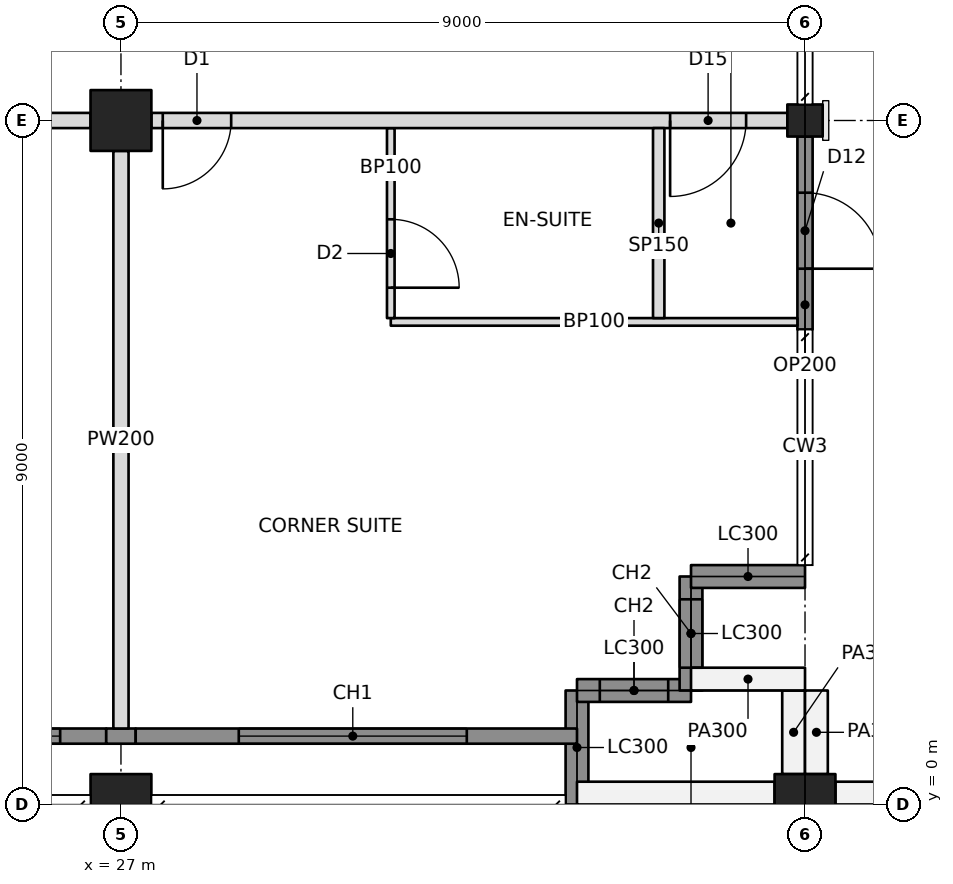
"""IFC4 building model, lengths in metres.
Left out: names, types, materials, properties, quantities, classifications, styles, units other than length and angle.
Written with IfcOpenShell. Run it as: python <this file> out.ifc"""

import sys

from ifc_helpers import new_model, si_unit, direction, frame, frame_2d, origin, origin_2d, place, context, subcontext, project, spatial, rectangle, hollow_rectangle, i_section, extrude, element, fill, save


model = new_model("IFC4")
c1 = context("Model", 3, precision=1e-05, world=origin(), true_north=direction((0.0, 1.0)))
c2 = subcontext(c1, "Body", "Model", "MODEL_VIEW")
j1 = project(units=[si_unit("LENGTHUNIT", "METRE"), si_unit("PLANEANGLEUNIT", "RADIAN")], contexts=[c1])
p1 = place(None, origin())
s1 = spatial("IfcSite", under=j1, at=p1, CompositionType="ELEMENT")
p2 = place(p1, origin())
s2 = spatial("IfcBuilding", under=s1, at=p2, CompositionType="ELEMENT")
p3 = place(p2, frame((0.0, 0.0, 226.6)))
s3 = spatial("IfcBuildingStorey", under=s2, at=p3, CompositionType="ELEMENT", Elevation=226.6)
p4 = place(p3, frame((27.0, 0.0, 0.0), z_axis=(0.0, 0.0, 1.0), x_axis=(1.0, 0.0, 0.0)))
e1 = element("IfcColumn", 1, at=p4, inside=s3, PredefinedType="COLUMN", context=c2, shape_type="SweptSolid", body=[
    extrude(hollow_rectangle(XDim=0.8, YDim=0.8, WallThickness=0.05, at=origin_2d()), origin(), (0.0, 0.0, 1.0), 3.6),
])
p5 = place(p3, frame((27.0, 9.0, 0.0), z_axis=(0.0, 0.0, 1.0), x_axis=(1.0, 0.0, 0.0)))
e2 = element("IfcColumn", 2, at=p5, inside=s3, PredefinedType="COLUMN", context=c2, shape_type="SweptSolid", body=[
    extrude(hollow_rectangle(XDim=0.8, YDim=0.8, WallThickness=0.1, at=origin_2d()), origin(), (0.0, 0.0, 1.0), 3.6),
])
p6 = place(p3, frame((36.0, 0.0, 0.0), z_axis=(0.0, 0.0, 1.0), x_axis=(1.0, 0.0, 0.0)))
e3 = element("IfcColumn", 3, at=p6, inside=s3, PredefinedType="COLUMN", context=c2, shape_type="SweptSolid", body=[
    extrude(hollow_rectangle(XDim=0.8, YDim=0.8, WallThickness=0.05, at=origin_2d()), origin(), (0.0, 0.0, 1.0), 3.6),
])
p7 = place(p3, frame((36.0, 9.0, 0.0), z_axis=(0.0, 0.0, 1.0), x_axis=(0.0, 1.0, 0.0)))
e4 = element("IfcColumn", 4, at=p7, inside=s3, PredefinedType="COLUMN", context=c2, shape_type="SweptSolid", body=[
    extrude(i_section(OverallWidth=0.422, OverallDepth=0.465, WebThickness=0.045, FlangeThickness=0.073, at=origin_2d()), origin(), (0.0, 0.0, 1.0), 3.6),
])
p8 = place(p3, frame((33.0, 0.0, 0.0), z_axis=(0.0, 0.0, 1.0), x_axis=(0.0, 1.0, 0.0)))
e5 = element("IfcWall", 5, at=p8, inside=s3, PredefinedType="SOLIDWALL", context=c2, shape_type="SweptSolid", body=[
    extrude(rectangle(XDim=1.5, YDim=0.3, at=frame_2d((0.75, 0.0))), origin(), (0.0, 0.0, 1.0), 2.62),
])
p9 = place(p3, frame((33.0, 1.5, 0.0), z_axis=(0.0, 0.0, 1.0), x_axis=(1.0, 0.0, 0.0)))
e6 = element("IfcWall", 6, at=p9, inside=s3, PredefinedType="SOLIDWALL", context=c2, shape_type="SweptSolid", body=[
    extrude(rectangle(XDim=1.5, YDim=0.3, at=frame_2d((0.75, 0.0))), origin(), (0.0, 0.0, 1.0), 3.4),
])
p10 = place(p9, frame((0.3, 0.0, 0.6)))
e7 = element("IfcOpeningElement", 7, at=p10, cuts=e6, PredefinedType="OPENING", context=c2, shape_type="SweptSolid", body=[
    extrude(rectangle(XDim=0.9, YDim=2.2, at=frame_2d((0.45, 1.1))), frame((0.0, 0.16, 0.0), z_axis=(0.0, -1.0, 0.0), x_axis=(1.0, 0.0, 0.0)), (0.0, 0.0, 1.0), 0.32),
])
p11 = place(p3, frame((34.5, 1.5, 0.0), z_axis=(0.0, 0.0, 1.0), x_axis=(0.0, 1.0, 0.0)))
e8 = element("IfcWall", 8, at=p11, inside=s3, PredefinedType="SOLIDWALL", context=c2, shape_type="SweptSolid", body=[
    extrude(rectangle(XDim=1.5, YDim=0.3, at=frame_2d((0.75, 0.0))), origin(), (0.0, 0.0, 1.0), 3.4),
])
p12 = place(p11, frame((0.3, 0.0, 0.6)))
e9 = element("IfcOpeningElement", 9, at=p12, cuts=e8, PredefinedType="OPENING", context=c2, shape_type="SweptSolid", body=[
    extrude(rectangle(XDim=0.9, YDim=2.2, at=frame_2d((0.45, 1.1))), frame((0.0, 0.16, 0.0), z_axis=(0.0, -1.0, 0.0), x_axis=(1.0, 0.0, 0.0)), (0.0, 0.0, 1.0), 0.32),
])
p13 = place(p3, frame((34.5, 3.0, 0.0), z_axis=(0.0, 0.0, 1.0), x_axis=(1.0, 0.0, 0.0)))
e10 = element("IfcWall", 10, at=p13, inside=s3, PredefinedType="SOLIDWALL", context=c2, shape_type="SweptSolid", body=[
    extrude(rectangle(XDim=1.5, YDim=0.3, at=frame_2d((0.75, 0.0))), origin(), (0.0, 0.0, 1.0), 2.62),
])
p14 = place(p3, frame((36.0, 8.789, 0.0), z_axis=(0.0, 0.0, 1.0), x_axis=(0.0, -1.0, 0.0)))
e11 = element("IfcWall", 11, at=p14, inside=s3, PredefinedType="SOLIDWALL", context=c2, shape_type="SweptSolid", body=[
    extrude(rectangle(XDim=2.539, YDim=0.2, at=frame_2d((1.27, 0.0))), origin(), (0.0, 0.0, 1.0), 2.62),
])
p15 = place(p14, frame((0.739, 0.0, 0.0)))
e12 = element("IfcOpeningElement", 12, at=p15, cuts=e11, PredefinedType="OPENING", context=c2, shape_type="SweptSolid", body=[
    extrude(rectangle(XDim=1.0, YDim=2.1, at=frame_2d((0.5, 1.05))), frame((0.0, 0.11, 0.0), z_axis=(0.0, -1.0, 0.0), x_axis=(1.0, 0.0, 0.0)), (0.0, 0.0, 1.0), 0.22),
])
p16 = place(p3, frame((35.6, 0.15, 0.0), z_axis=(0.0, 0.0, 1.0), x_axis=(-1.0, 0.0, 0.0)))
e13 = element("IfcWall", 13, at=p16, inside=s3, PredefinedType="PARAPET", context=c2, shape_type="SweptSolid", body=[
    extrude(rectangle(XDim=2.6, YDim=0.3, at=frame_2d((1.3, 0.0))), origin(), (0.0, 0.0, 1.0), 1.1),
])
p17 = place(p3, frame((35.85, 1.5, 0.0), z_axis=(0.0, 0.0, 1.0), x_axis=(0.0, -1.0, 0.0)))
e14 = element("IfcWall", 14, at=p17, inside=s3, PredefinedType="PARAPET", context=c2, shape_type="SweptSolid", body=[
    extrude(rectangle(XDim=1.1, YDim=0.3, at=frame_2d((0.55, 0.0))), origin(), (0.0, 0.0, 1.0), 1.1),
])
p18 = place(p3, frame((42.0, 0.15, 0.0), z_axis=(0.0, 0.0, 1.0), x_axis=(-1.0, 0.0, 0.0)))
e15 = element("IfcWall", 15, at=p18, inside=s3, PredefinedType="PARAPET", context=c2, shape_type="SweptSolid", body=[
    extrude(rectangle(XDim=5.6, YDim=0.3, at=frame_2d((2.8, 0.0))), origin(), (0.0, 0.0, 1.0), 1.1),
])
p19 = place(p3, frame((36.15, 0.4, 0.0), z_axis=(0.0, 0.0, 1.0), x_axis=(0.0, 1.0, 0.0)))
e16 = element("IfcWall", 16, at=p19, inside=s3, PredefinedType="PARAPET", context=c2, shape_type="SweptSolid", body=[
    extrude(rectangle(XDim=1.1, YDim=0.3, at=frame_2d((0.55, 0.0))), origin(), (0.0, 0.0, 1.0), 1.1),
])
p20 = place(p3, frame((36.0, 1.65, 0.0), z_axis=(0.0, 0.0, 1.0), x_axis=(-1.0, 0.0, 0.0)))
e17 = element("IfcWall", 17, at=p20, inside=s3, PredefinedType="PARAPET", context=c2, shape_type="SweptSolid", body=[
    extrude(rectangle(XDim=1.5, YDim=0.3, at=frame_2d((0.75, 0.0))), origin(), (0.0, 0.0, 1.0), 1.1),
])
p21 = place(p3, frame((18.4, 9.0, 0.0), z_axis=(0.0, 0.0, 1.0), x_axis=(1.0, 0.0, 0.0)))
e18 = element("IfcWall", 18, at=p21, inside=s3, PredefinedType="PARTITIONING", context=c2, shape_type="SweptSolid", body=[
    extrude(rectangle(XDim=8.2, YDim=0.2, at=frame_2d((4.1, 0.0))), origin(), (0.0, 0.0, 1.0), 2.605),
])
p22 = place(p3, frame((27.4, 9.0, 0.0), z_axis=(0.0, 0.0, 1.0), x_axis=(1.0, 0.0, 0.0)))
e19 = element("IfcWall", 19, at=p22, inside=s3, PredefinedType="PARTITIONING", context=c2, shape_type="SweptSolid", body=[
    extrude(rectangle(XDim=8.368, YDim=0.2, at=frame_2d((4.184, 0.0))), origin(), (0.0, 0.0, 1.0), 2.605),
])
p23 = place(p22, frame((6.825, 0.0, 0.0)))
e20 = element("IfcOpeningElement", 20, at=p23, cuts=e19, PredefinedType="OPENING", context=c2, shape_type="SweptSolid", body=[
    extrude(rectangle(XDim=1.0, YDim=2.1, at=frame_2d((0.5, 1.05))), frame((0.0, 0.11, 0.0), z_axis=(0.0, -1.0, 0.0), x_axis=(1.0, 0.0, 0.0)), (0.0, 0.0, 1.0), 0.22),
])
p24 = place(p22, frame((0.15, 0.0, 0.0)))
e21 = element("IfcOpeningElement", 21, at=p24, cuts=e19, PredefinedType="OPENING", context=c2, shape_type="SweptSolid", body=[
    extrude(rectangle(XDim=0.9, YDim=2.1, at=frame_2d((0.45, 1.05))), frame((0.0, 0.11, 0.0), z_axis=(0.0, -1.0, 0.0), x_axis=(1.0, 0.0, 0.0)), (0.0, 0.0, 1.0), 0.22),
])
p25 = place(p3, frame((27.0, 8.6, 0.0), z_axis=(0.0, 0.0, 1.0), x_axis=(0.0, -1.0, 0.0)))
e22 = element("IfcWall", 22, at=p25, inside=s3, PredefinedType="PARTITIONING", context=c2, shape_type="SweptSolid", body=[
    extrude(rectangle(XDim=7.6, YDim=0.2, at=frame_2d((3.8, 0.0))), origin(), (0.0, 0.0, 1.0), 2.605),
])
p26 = place(p3, frame((30.55, 6.35, 0.0), z_axis=(0.0, 0.0, 1.0), x_axis=(1.0, 0.0, 0.0)))
e23 = element("IfcWall", 23, at=p26, inside=s3, PredefinedType="PARTITIONING", context=c2, shape_type="SweptSolid", body=[
    extrude(rectangle(XDim=5.35, YDim=0.1, at=frame_2d((2.675, 0.0))), origin(), (0.0, 0.0, 1.0), 2.62),
])
p27 = place(p3, frame((34.075, 8.9, 0.0), z_axis=(0.0, 0.0, 1.0), x_axis=(0.0, -1.0, 0.0)))
e24 = element("IfcWall", 24, at=p27, inside=s3, PredefinedType="PARTITIONING", context=c2, shape_type="SweptSolid", body=[
    extrude(rectangle(XDim=2.5, YDim=0.15, at=frame_2d((1.25, 0.0))), origin(), (0.0, 0.0, 1.0), 2.604),
])
p28 = place(p3, frame((30.55, 8.9, 0.0), z_axis=(0.0, 0.0, 1.0), x_axis=(0.0, -1.0, 0.0)))
e25 = element("IfcWall", 25, at=p28, inside=s3, PredefinedType="PARTITIONING", context=c2, shape_type="SweptSolid", body=[
    extrude(rectangle(XDim=2.5, YDim=0.1, at=frame_2d((1.25, 0.0))), origin(), (0.0, 0.0, 1.0), 2.604),
])
p29 = place(p28, frame((1.2, 0.0, 0.0)))
e26 = element("IfcOpeningElement", 26, at=p29, cuts=e25, PredefinedType="OPENING", context=c2, shape_type="SweptSolid", body=[
    extrude(rectangle(XDim=0.9, YDim=2.1, at=frame_2d((0.45, 1.05))), frame((0.0, 0.06, 0.0), z_axis=(0.0, -1.0, 0.0), x_axis=(1.0, 0.0, 0.0)), (0.0, 0.0, 1.0), 0.12),
])
p30 = place(p3, frame((18.194, 0.9, 0.0), z_axis=(0.0, 0.0, 1.0), x_axis=(1.0, 0.0, 0.0)))
e27 = element("IfcWall", 27, at=p30, inside=s3, PredefinedType="SOLIDWALL", context=c2, shape_type="SweptSolid", body=[
    extrude(rectangle(XDim=8.612, YDim=0.2, at=frame_2d((4.306, 0.0))), origin(), (0.0, 0.0, 1.0), 3.4),
])
p31 = place(p30, frame((0.606, 0.0, 0.6)))
e28 = element("IfcOpeningElement", 28, at=p31, cuts=e27, PredefinedType="OPENING", context=c2, shape_type="SweptSolid", body=[
    extrude(rectangle(XDim=3.0, YDim=2.2, at=frame_2d((1.5, 1.1))), frame((0.0, 0.11, 0.0), z_axis=(0.0, -1.0, 0.0), x_axis=(1.0, 0.0, 0.0)), (0.0, 0.0, 1.0), 0.22),
])
p32 = place(p30, frame((5.006, 0.0, 0.6)))
e29 = element("IfcOpeningElement", 29, at=p32, cuts=e27, PredefinedType="OPENING", context=c2, shape_type="SweptSolid", body=[
    extrude(rectangle(XDim=3.0, YDim=2.2, at=frame_2d((1.5, 1.1))), frame((0.0, 0.11, 0.0), z_axis=(0.0, -1.0, 0.0), x_axis=(1.0, 0.0, 0.0)), (0.0, 0.0, 1.0), 0.22),
])
p33 = place(p3, frame((26.806, 0.9, 0.0), z_axis=(0.0, 0.0, 1.0), x_axis=(1.0, 0.0, 0.0)))
e30 = element("IfcWall", 30, at=p33, inside=s3, PredefinedType="SOLIDWALL", context=c2, shape_type="SweptSolid", body=[
    extrude(rectangle(XDim=0.388, YDim=0.2, at=frame_2d((0.194, 0.0))), origin(), (0.0, 0.0, 1.0), 2.604),
])
p34 = place(p3, frame((27.194, 0.9, 0.0), z_axis=(0.0, 0.0, 1.0), x_axis=(1.0, 0.0, 0.0)))
e31 = element("IfcWall", 31, at=p34, inside=s3, PredefinedType="SOLIDWALL", context=c2, shape_type="SweptSolid", body=[
    extrude(rectangle(XDim=5.806, YDim=0.2, at=frame_2d((2.903, 0.0))), origin(), (0.0, 0.0, 1.0), 3.4),
])
p35 = place(p34, frame((1.356, 0.0, 0.6)))
e32 = element("IfcOpeningElement", 32, at=p35, cuts=e31, PredefinedType="OPENING", context=c2, shape_type="SweptSolid", body=[
    extrude(rectangle(XDim=3.0, YDim=2.2, at=frame_2d((1.5, 1.1))), frame((0.0, 0.11, 0.0), z_axis=(0.0, -1.0, 0.0), x_axis=(1.0, 0.0, 0.0)), (0.0, 0.0, 1.0), 0.22),
])
p36 = place(p10, origin())
e33 = element("IfcWindow", 33, at=p36, inside=s3, PartitioningType="SINGLE_PANEL", PredefinedType="WINDOW", context=c2, shape_type="SweptSolid", body=[
    extrude(rectangle(XDim=0.9, YDim=2.2, at=frame_2d((0.45, 1.1))), frame((0.0, 0.03, 0.0), z_axis=(0.0, -1.0, 0.0), x_axis=(1.0, 0.0, 0.0)), (0.0, 0.0, 1.0), 0.06),
])
fill(e7, e33)
p37 = place(p12, origin())
e34 = element("IfcWindow", 34, at=p37, inside=s3, PartitioningType="SINGLE_PANEL", PredefinedType="WINDOW", context=c2, shape_type="SweptSolid", body=[
    extrude(rectangle(XDim=0.9, YDim=2.2, at=frame_2d((0.45, 1.1))), frame((0.0, 0.03, 0.0), z_axis=(0.0, -1.0, 0.0), x_axis=(1.0, 0.0, 0.0)), (0.0, 0.0, 1.0), 0.06),
])
fill(e9, e34)
p38 = place(p32, origin())
e35 = element("IfcWindow", 35, at=p38, inside=s3, PartitioningType="TRIPLE_PANEL_VERTICAL", PredefinedType="WINDOW", context=c2, shape_type="SweptSolid", body=[
    extrude(rectangle(XDim=3.0, YDim=2.2, at=frame_2d((1.5, 1.1))), frame((0.0, 0.03, 0.0), z_axis=(0.0, -1.0, 0.0), x_axis=(1.0, 0.0, 0.0)), (0.0, 0.0, 1.0), 0.06),
])
fill(e29, e35)
p39 = place(p35, origin())
e36 = element("IfcWindow", 36, at=p39, inside=s3, PartitioningType="TRIPLE_PANEL_VERTICAL", PredefinedType="WINDOW", context=c2, shape_type="SweptSolid", body=[
    extrude(rectangle(XDim=3.0, YDim=2.2, at=frame_2d((1.5, 1.1))), frame((0.0, 0.03, 0.0), z_axis=(0.0, -1.0, 0.0), x_axis=(1.0, 0.0, 0.0)), (0.0, 0.0, 1.0), 0.06),
])
fill(e32, e36)
p40 = place(p15, origin())
e37 = element("IfcDoor", 37, at=p40, inside=s3, OperationType="SINGLE_SWING_RIGHT", PredefinedType="DOOR", context=c2, shape_type="SweptSolid", body=[
    extrude(rectangle(XDim=1.0, YDim=2.1, at=frame_2d((0.5, 1.05))), frame((0.0, 0.025, 0.0), z_axis=(0.0, -1.0, 0.0), x_axis=(1.0, 0.0, 0.0)), (0.0, 0.0, 1.0), 0.05),
])
fill(e12, e37)
p41 = place(p23, frame((1.0, 0.0, 0.0), z_axis=(0.0, 0.0, 1.0), x_axis=(-1.0, 0.0, 0.0)))
e38 = element("IfcDoor", 38, at=p41, inside=s3, OperationType="SINGLE_SWING_RIGHT", PredefinedType="DOOR", context=c2, shape_type="SweptSolid", body=[
    extrude(rectangle(XDim=1.0, YDim=2.1, at=frame_2d((0.5, 1.05))), frame((0.0, 0.025, 0.0), z_axis=(0.0, -1.0, 0.0), x_axis=(1.0, 0.0, 0.0)), (0.0, 0.0, 1.0), 0.05),
])
fill(e20, e38)
p42 = place(p29, origin())
e39 = element("IfcDoor", 39, at=p42, inside=s3, OperationType="SINGLE_SWING_RIGHT", PredefinedType="DOOR", context=c2, shape_type="SweptSolid", body=[
    extrude(rectangle(XDim=0.9, YDim=2.1, at=frame_2d((0.45, 1.05))), frame((0.0, 0.025, 0.0), z_axis=(0.0, -1.0, 0.0), x_axis=(1.0, 0.0, 0.0)), (0.0, 0.0, 1.0), 0.05),
])
fill(e26, e39)
p43 = place(p24, frame((0.9, 0.0, 0.0), z_axis=(0.0, 0.0, 1.0), x_axis=(-1.0, 0.0, 0.0)))
e40 = element("IfcDoor", 40, at=p43, inside=s3, OperationType="SINGLE_SWING_RIGHT", PredefinedType="DOOR", context=c2, shape_type="SweptSolid", body=[
    extrude(rectangle(XDim=0.9, YDim=2.1, at=frame_2d((0.45, 1.05))), frame((0.0, 0.025, 0.0), z_axis=(0.0, -1.0, 0.0), x_axis=(1.0, 0.0, 0.0)), (0.0, 0.0, 1.0), 0.05),
])
fill(e21, e40)
save(model, sys.argv[1])
